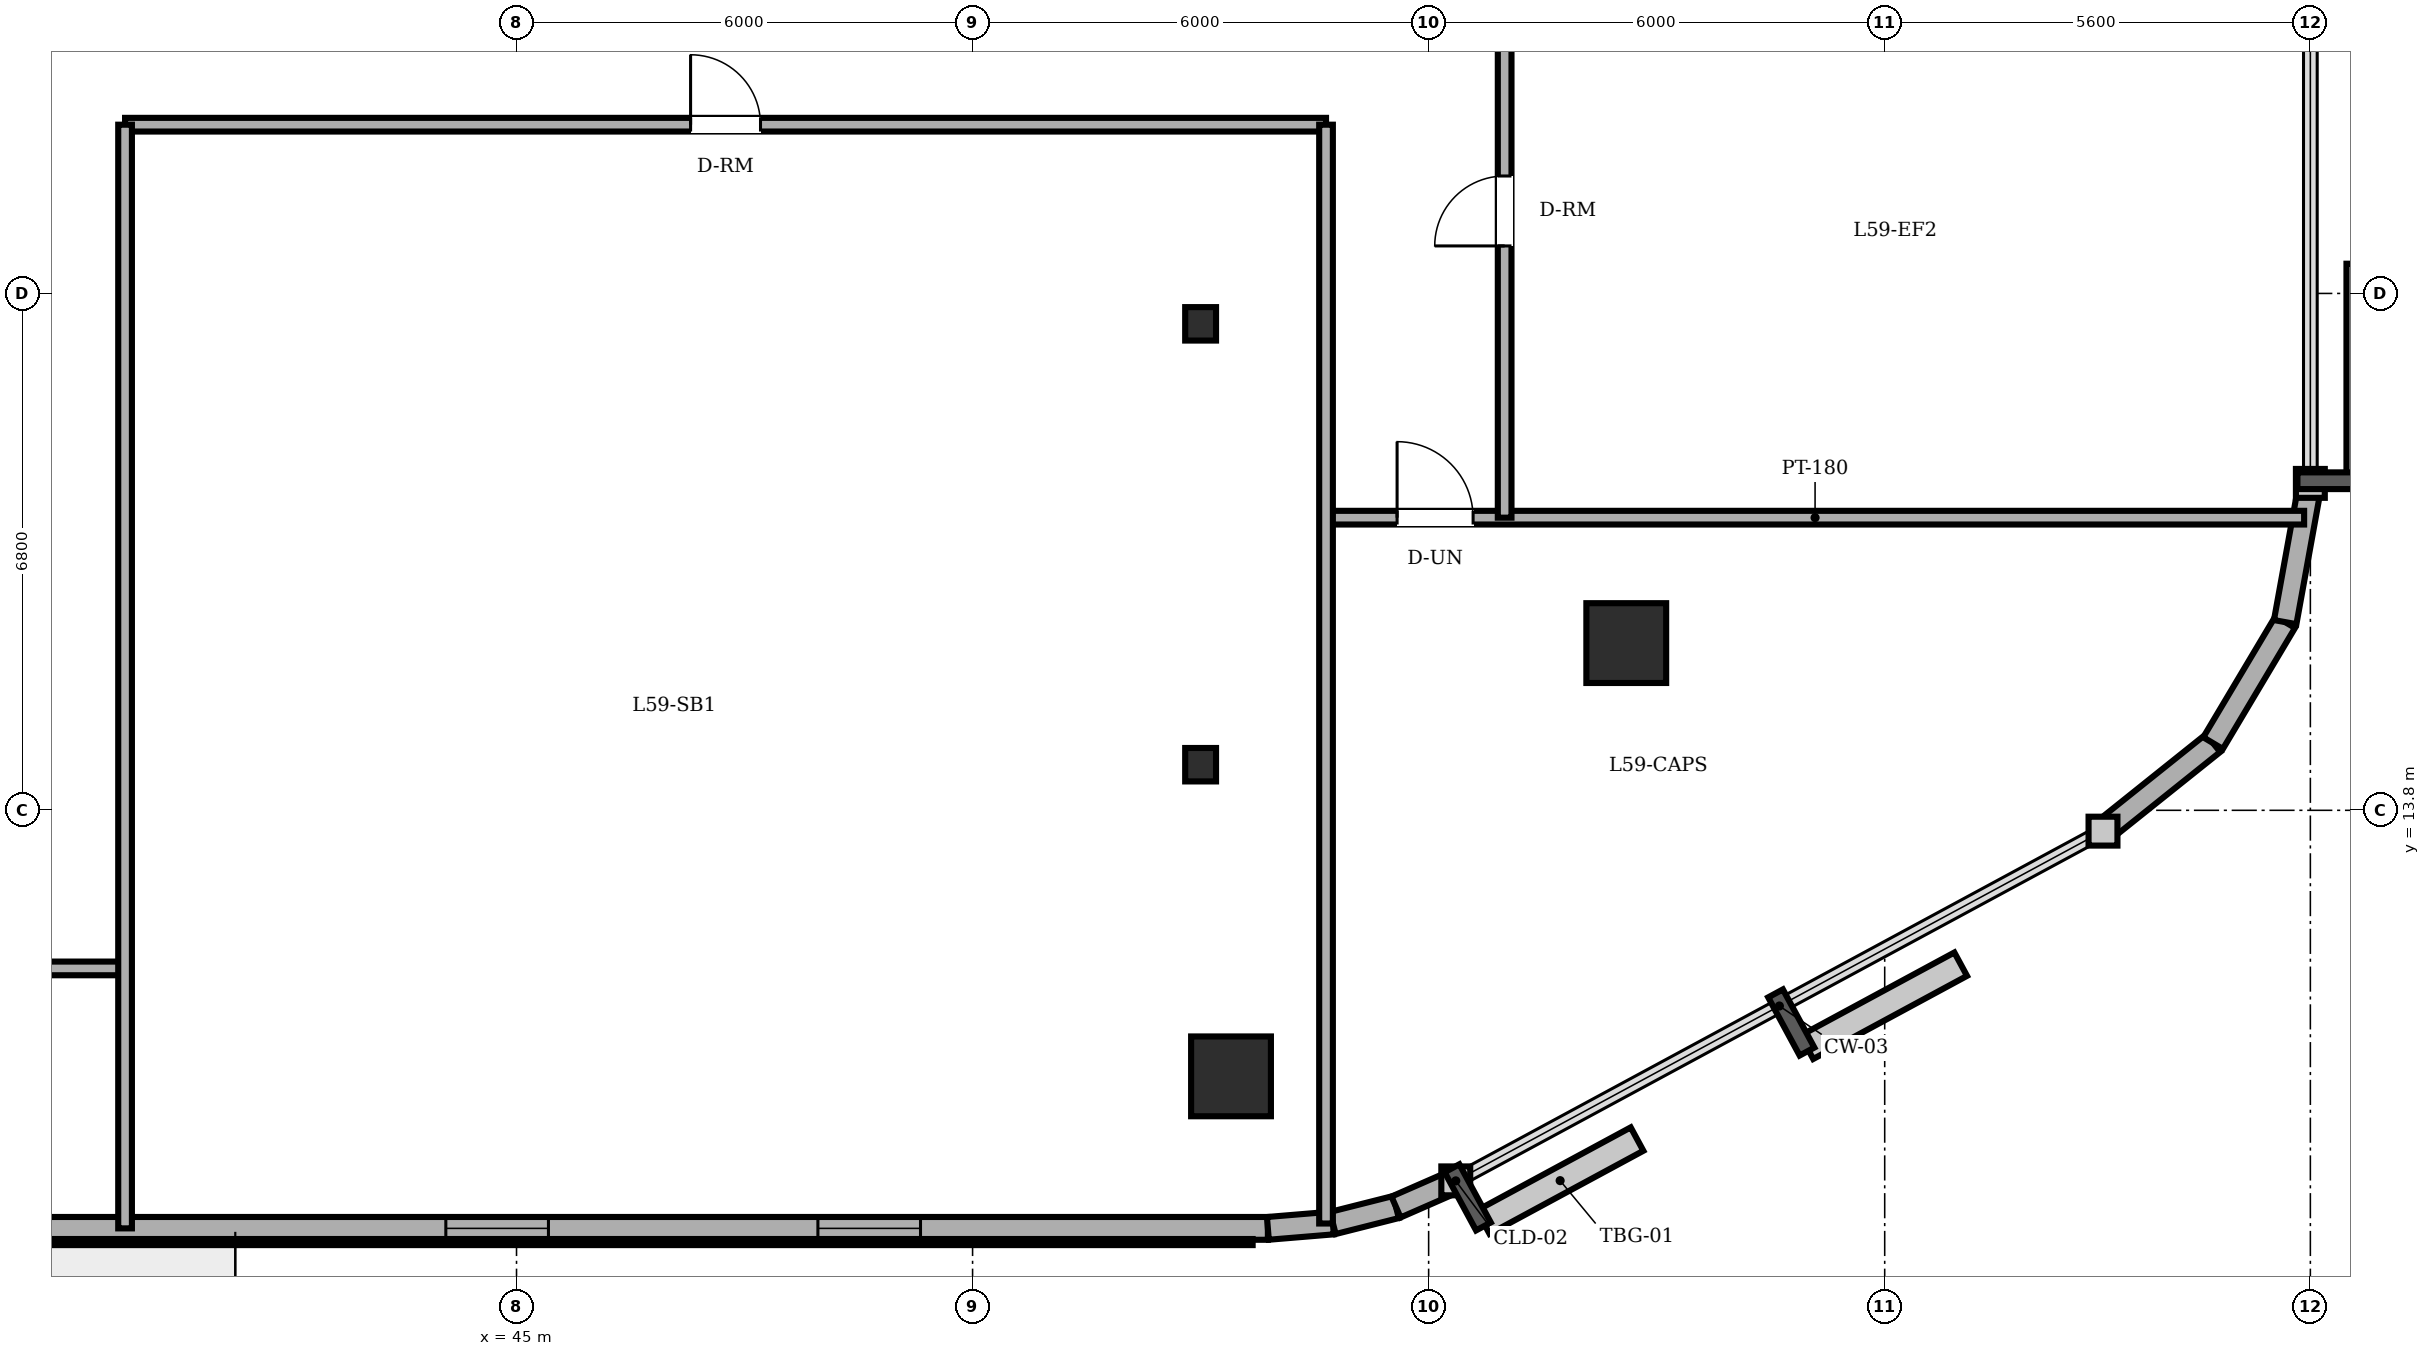
"""IFC4 building model, lengths in metres.
Left out: names, types, materials, properties, quantities, classifications, styles, units other than length and angle.
Written with IfcOpenShell. Run it as: python <this file> out.ifc"""

import sys

from ifc_helpers import new_model, si_unit, direction, frame, frame_2d, origin, origin_2d, place, context, subcontext, project, spatial, rectangle, circle, i_section, extrude, element, fill, save


model = new_model("IFC4")
c1 = context("Model", 3, precision=1e-05, world=origin(), true_north=direction((0.0, 1.0)))
c2 = subcontext(c1, "Body", "Model", "MODEL_VIEW")
j1 = project(units=[si_unit("LENGTHUNIT", "METRE"), si_unit("PLANEANGLEUNIT", "RADIAN")], contexts=[c1])
p1 = place(None, origin())
s1 = spatial("IfcSite", under=j1, at=p1, CompositionType="ELEMENT")
p2 = place(p1, origin())
s2 = spatial("IfcBuilding", under=s1, at=p2, CompositionType="ELEMENT")
p3 = place(p2, frame((0.0, 0.0, 226.5)))
s3 = spatial("IfcBuildingStorey", under=s2, at=p3, CompositionType="ELEMENT", Elevation=226.5)
for number, where, z_axis, x_axis in (
    (1, (54.4, 10.3, 0.0), (0.0, 0.0, 1.0), (1.0, 0.0, 0.0)),
    (2, (59.6, 16.0, 0.0), (0.0, 0.0, 1.0), (1.0, 0.0, 0.0)),
):
    element("IfcColumn", number, at=place(p3, frame(where, z_axis=z_axis, x_axis=x_axis)), inside=s3, PredefinedType="COLUMN", context=c2, shape_type="SweptSolid", body=[
        extrude(circle(Radius=0.525, at=origin_2d()), origin(), (0.0, 0.0, 1.0), 3.6),
    ])
for number, where, z_axis, x_axis in (
    (3, (54.0, 14.4, 0.0), (0.0, 0.0, 1.0), (1.0, 0.0, 0.0)),
    (4, (54.0, 20.2, 0.0), (0.0, 0.0, 1.0), (1.0, 0.0, 0.0)),
):
    element("IfcColumn", number, at=place(p3, frame(where, z_axis=z_axis, x_axis=x_axis)), inside=s3, PredefinedType="COLUMN", context=c2, shape_type="SweptSolid", body=[
        extrude(i_section(OverallWidth=0.406, OverallDepth=0.44, WebThickness=0.024, FlangeThickness=0.039, FilletRadius=0.015, at=origin_2d()), origin(), (0.0, 0.0, 1.0), 3.6),
    ])
p4 = place(p3, frame((22.4, 8.3, 0.0), z_axis=(0.0, 0.0, 1.0), x_axis=(1.0, 0.0, 0.0)))
e5 = element("IfcWall", 5, at=p4, inside=s3, PredefinedType="SOLIDWALL", context=c2, shape_type="SweptSolid", body=[
    extrude(rectangle(XDim=32.485, YDim=0.3, at=frame_2d((16.243, 0.0))), origin(), (0.0, 0.0, 1.0), 3.4),
])
p5 = place(p4, frame((12.425, 0.0, 0.0)))
e6 = element("IfcOpeningElement", 6, at=p5, cuts=e5, PredefinedType="OPENING", context=c2, shape_type="SweptSolid", body=[
    extrude(rectangle(XDim=0.95, YDim=2.2, at=frame_2d((0.475, 1.1))), frame((0.0, 0.16, 0.0), z_axis=(0.0, -1.0, 0.0), x_axis=(1.0, 0.0, 0.0)), (0.0, 0.0, 1.0), 0.32),
])
p6 = place(p4, frame((1.3, 0.0, 0.85)))
e7 = element("IfcOpeningElement", 7, at=p6, cuts=e5, PredefinedType="OPENING", context=c2, shape_type="SweptSolid", body=[
    extrude(rectangle(XDim=1.35, YDim=1.55, at=frame_2d((0.675, 0.775))), frame((0.0, 0.16, 0.0), z_axis=(0.0, -1.0, 0.0), x_axis=(1.0, 0.0, 0.0)), (0.0, 0.0, 1.0), 0.32),
])
p7 = place(p4, frame((4.825, 0.0, 0.85)))
e8 = element("IfcOpeningElement", 8, at=p7, cuts=e5, PredefinedType="OPENING", context=c2, shape_type="SweptSolid", body=[
    extrude(rectangle(XDim=1.35, YDim=1.55, at=frame_2d((0.675, 0.775))), frame((0.0, 0.16, 0.0), z_axis=(0.0, -1.0, 0.0), x_axis=(1.0, 0.0, 0.0)), (0.0, 0.0, 1.0), 0.32),
])
p8 = place(p4, frame((10.075, 0.0, 0.85)))
e9 = element("IfcOpeningElement", 9, at=p8, cuts=e5, PredefinedType="OPENING", context=c2, shape_type="SweptSolid", body=[
    extrude(rectangle(XDim=1.35, YDim=1.55, at=frame_2d((0.675, 0.775))), frame((0.0, 0.16, 0.0), z_axis=(0.0, -1.0, 0.0), x_axis=(1.0, 0.0, 0.0)), (0.0, 0.0, 1.0), 0.32),
])
p9 = place(p4, frame((21.67, 0.0, 0.85)))
e10 = element("IfcOpeningElement", 10, at=p9, cuts=e5, PredefinedType="OPENING", context=c2, shape_type="SweptSolid", body=[
    extrude(rectangle(XDim=1.35, YDim=1.55, at=frame_2d((0.675, 0.775))), frame((0.0, 0.16, 0.0), z_axis=(0.0, -1.0, 0.0), x_axis=(1.0, 0.0, 0.0)), (0.0, 0.0, 1.0), 0.32),
])
p10 = place(p4, frame((26.565, 0.0, 0.85)))
e11 = element("IfcOpeningElement", 11, at=p10, cuts=e5, PredefinedType="OPENING", context=c2, shape_type="SweptSolid", body=[
    extrude(rectangle(XDim=1.35, YDim=1.55, at=frame_2d((0.675, 0.775))), frame((0.0, 0.16, 0.0), z_axis=(0.0, -1.0, 0.0), x_axis=(1.0, 0.0, 0.0)), (0.0, 0.0, 1.0), 0.32),
])
p11 = place(p3, frame((54.885, 8.3, 0.0), z_axis=(0.0, 0.0, 1.0), x_axis=(0.996565355958, 0.082809971041, 0.0)))
e12 = element("IfcWall", 12, at=p11, inside=s3, PredefinedType="SOLIDWALL", context=c2, shape_type="SweptSolid", body=[
    extrude(rectangle(XDim=0.858, YDim=0.3, at=frame_2d((0.429, 0.0))), origin(), (0.0, 0.0, 1.0), 3.4),
])
p12 = place(p3, frame((55.74, 8.371, 0.0), z_axis=(0.0, 0.0, 1.0), x_axis=(0.969536346338, 0.244947490555, 0.0)))
e13 = element("IfcWall", 13, at=p12, inside=s3, PredefinedType="SOLIDWALL", context=c2, shape_type="SweptSolid", body=[
    extrude(rectangle(XDim=0.857, YDim=0.3, at=frame_2d((0.429, 0.0))), origin(), (0.0, 0.0, 1.0), 3.4),
])
p13 = place(p3, frame((56.571, 8.581, 0.0), z_axis=(0.0, 0.0, 1.0), x_axis=(0.916085473636, 0.400983048261, 0.0)))
e14 = element("IfcWall", 14, at=p13, inside=s3, PredefinedType="SOLIDWALL", context=c2, shape_type="SweptSolid", body=[
    extrude(rectangle(XDim=0.858, YDim=0.3, at=frame_2d((0.429, 0.0))), origin(), (0.0, 0.0, 1.0), 3.4),
])
p14 = place(p3, frame((65.872, 13.526, 0.0), z_axis=(0.0, 0.0, 1.0), x_axis=(0.780920189257, 0.624630817372, 0.0)))
e15 = element("IfcWall", 15, at=p14, inside=s3, PredefinedType="SOLIDWALL", context=c2, shape_type="SweptSolid", body=[
    extrude(rectangle(XDim=1.854, YDim=0.3, at=frame_2d((0.927, 0.0))), origin(), (0.0, 0.0, 1.0), 3.4),
])
p15 = place(p3, frame((67.32, 14.684, 0.0), z_axis=(0.0, 0.0, 1.0), x_axis=(0.512072018927, 0.858942516955, 0.0)))
e16 = element("IfcWall", 16, at=p15, inside=s3, PredefinedType="SOLIDWALL", context=c2, shape_type="SweptSolid", body=[
    extrude(rectangle(XDim=1.853, YDim=0.3, at=frame_2d((0.927, 0.0))), origin(), (0.0, 0.0, 1.0), 3.4),
])
p16 = place(p3, frame((68.269, 16.276, 0.0), z_axis=(0.0, 0.0, 1.0), x_axis=(0.178468469252, 0.983945631365, 0.0)))
e17 = element("IfcWall", 17, at=p16, inside=s3, PredefinedType="SOLIDWALL", context=c2, shape_type="SweptSolid", body=[
    extrude(rectangle(XDim=1.855, YDim=0.3, at=frame_2d((0.927, 0.0))), origin(), (0.0, 0.0, 1.0), 3.4),
])
p17 = place(p3, frame((17.677, 11.72, 0.0), z_axis=(0.0, 0.0, 1.0), x_axis=(1.0, 0.0, 0.0)))
e18 = element("IfcWall", 18, at=p17, inside=s3, PredefinedType="PARTITIONING", context=c2, shape_type="SweptSolid", body=[
    extrude(rectangle(XDim=22.173, YDim=0.18, at=frame_2d((11.086, 0.0))), origin(), (0.0, 0.0, 1.0), 3.4),
])
p18 = place(p17, frame((9.763, 0.0, 0.0)))
e19 = element("IfcOpeningElement", 19, at=p18, cuts=e18, PredefinedType="OPENING", context=c2, shape_type="SweptSolid", body=[
    extrude(rectangle(XDim=0.92, YDim=2.1, at=frame_2d((0.46, 1.05))), frame((0.0, 0.1, 0.0), z_axis=(0.0, -1.0, 0.0), x_axis=(1.0, 0.0, 0.0)), (0.0, 0.0, 1.0), 0.2),
])
p19 = place(p17, frame((4.063, 0.0, 0.0)))
e20 = element("IfcOpeningElement", 20, at=p19, cuts=e18, PredefinedType="OPENING", context=c2, shape_type="SweptSolid", body=[
    extrude(rectangle(XDim=0.92, YDim=2.1, at=frame_2d((0.46, 1.05))), frame((0.0, 0.1, 0.0), z_axis=(0.0, -1.0, 0.0), x_axis=(1.0, 0.0, 0.0)), (0.0, 0.0, 1.0), 0.2),
])
p20 = place(p17, frame((16.428, 0.0, 0.0)))
e21 = element("IfcOpeningElement", 21, at=p20, cuts=e18, PredefinedType="OPENING", context=c2, shape_type="SweptSolid", body=[
    extrude(rectangle(XDim=0.92, YDim=2.1, at=frame_2d((0.46, 1.05))), frame((0.0, 0.1, 0.0), z_axis=(0.0, -1.0, 0.0), x_axis=(1.0, 0.0, 0.0)), (0.0, 0.0, 1.0), 0.2),
])
p21 = place(p3, frame((55.65, 17.65, 0.0), z_axis=(0.0, 0.0, 1.0), x_axis=(1.0, 0.0, 0.0)))
e22 = element("IfcWall", 22, at=p21, inside=s3, PredefinedType="PARTITIONING", context=c2, shape_type="SweptSolid", body=[
    extrude(rectangle(XDim=12.868, YDim=0.18, at=frame_2d((6.434, 0.0))), origin(), (0.0, 0.0, 1.0), 3.4),
])
p22 = place(p21, frame((0.935, 0.0, 0.0)))
e23 = element("IfcOpeningElement", 23, at=p22, cuts=e22, PredefinedType="OPENING", context=c2, shape_type="SweptSolid", body=[
    extrude(rectangle(XDim=1.0, YDim=2.15, at=frame_2d((0.5, 1.075))), frame((0.0, 0.1, 0.0), z_axis=(0.0, -1.0, 0.0), x_axis=(1.0, 0.0, 0.0)), (0.0, 0.0, 1.0), 0.2),
])
p23 = place(p3, frame((39.85, 22.82, 0.0), z_axis=(0.0, 0.0, 1.0), x_axis=(1.0, 0.0, 0.0)))
e24 = element("IfcWall", 24, at=p23, inside=s3, PredefinedType="PARTITIONING", context=c2, shape_type="SweptSolid", body=[
    extrude(rectangle(XDim=15.8, YDim=0.18, at=frame_2d((7.9, 0.0))), origin(), (0.0, 0.0, 1.0), 3.4),
])
p24 = place(p23, frame((7.44, 0.0, 0.0)))
e25 = element("IfcOpeningElement", 25, at=p24, cuts=e24, PredefinedType="OPENING", context=c2, shape_type="SweptSolid", body=[
    extrude(rectangle(XDim=0.92, YDim=2.1, at=frame_2d((0.46, 1.05))), frame((0.0, 0.1, 0.0), z_axis=(0.0, -1.0, 0.0), x_axis=(1.0, 0.0, 0.0)), (0.0, 0.0, 1.0), 0.2),
])
p25 = place(p3, frame((39.85, 8.3, 0.0), z_axis=(0.0, 0.0, 1.0), x_axis=(0.0, 1.0, 0.0)))
e26 = element("IfcWall", 26, at=p25, inside=s3, PredefinedType="PARTITIONING", context=c2, shape_type="SweptSolid", body=[
    extrude(rectangle(XDim=14.52, YDim=0.18, at=frame_2d((7.26, 0.0))), origin(), (0.0, 0.0, 1.0), 3.4),
])
p26 = place(p3, frame((55.65, 8.364, 0.0), z_axis=(0.0, 0.0, 1.0), x_axis=(0.0, 1.0, 0.0)))
e27 = element("IfcWall", 27, at=p26, inside=s3, PredefinedType="PARTITIONING", context=c2, shape_type="SweptSolid", body=[
    extrude(rectangle(XDim=14.456, YDim=0.18, at=frame_2d((7.228, 0.0))), origin(), (0.0, 0.0, 1.0), 3.4),
])
p27 = place(p3, frame((58.0, 17.65, 0.0), z_axis=(0.0, 0.0, 1.0), x_axis=(0.0, 1.0, 0.0)))
e28 = element("IfcWall", 28, at=p27, inside=s3, PredefinedType="PARTITIONING", context=c2, shape_type="SweptSolid", body=[
    extrude(rectangle(XDim=12.7, YDim=0.18, at=frame_2d((6.35, 0.0))), origin(), (0.0, 0.0, 1.0), 3.4),
])
p28 = place(p27, frame((9.365, 0.0, 0.0)))
e29 = element("IfcOpeningElement", 29, at=p28, cuts=e28, PredefinedType="OPENING", context=c2, shape_type="SweptSolid", body=[
    extrude(rectangle(XDim=1.0, YDim=2.15, at=frame_2d((0.5, 1.075))), frame((0.0, 0.1, 0.0), z_axis=(0.0, -1.0, 0.0), x_axis=(1.0, 0.0, 0.0)), (0.0, 0.0, 1.0), 0.2),
])
p29 = place(p27, frame((3.575, 0.0, 0.0)))
e30 = element("IfcOpeningElement", 30, at=p29, cuts=e28, PredefinedType="OPENING", context=c2, shape_type="SweptSolid", body=[
    extrude(rectangle(XDim=0.92, YDim=2.1, at=frame_2d((0.46, 1.05))), frame((0.0, 0.1, 0.0), z_axis=(0.0, -1.0, 0.0), x_axis=(1.0, 0.0, 0.0)), (0.0, 0.0, 1.0), 0.2),
])
p30 = place(p9, origin())
e31 = element("IfcWindow", 31, at=p30, inside=s3, PartitioningType="SINGLE_PANEL", PredefinedType="WINDOW", context=c2, shape_type="SweptSolid", body=[
    extrude(rectangle(XDim=1.35, YDim=1.55, at=frame_2d((0.675, 0.775))), frame((0.0, 0.03, 0.0), z_axis=(0.0, -1.0, 0.0), x_axis=(1.0, 0.0, 0.0)), (0.0, 0.0, 1.0), 0.06),
])
fill(e10, e31)
p31 = place(p10, origin())
e32 = element("IfcWindow", 32, at=p31, inside=s3, PartitioningType="SINGLE_PANEL", PredefinedType="WINDOW", context=c2, shape_type="SweptSolid", body=[
    extrude(rectangle(XDim=1.35, YDim=1.55, at=frame_2d((0.675, 0.775))), frame((0.0, 0.03, 0.0), z_axis=(0.0, -1.0, 0.0), x_axis=(1.0, 0.0, 0.0)), (0.0, 0.0, 1.0), 0.06),
])
fill(e11, e32)
p32 = place(p24, origin())
e33 = element("IfcDoor", 33, at=p32, inside=s3, OperationType="SINGLE_SWING_LEFT", PredefinedType="DOOR", context=c2, shape_type="SweptSolid", body=[
    extrude(rectangle(XDim=0.92, YDim=2.1, at=frame_2d((0.46, 1.05))), frame((0.0, 0.025, 0.0), z_axis=(0.0, -1.0, 0.0), x_axis=(1.0, 0.0, 0.0)), (0.0, 0.0, 1.0), 0.05),
])
fill(e25, e33)
p33 = place(p22, origin())
e34 = element("IfcDoor", 34, at=p33, inside=s3, OperationType="SINGLE_SWING_LEFT", PredefinedType="DOOR", context=c2, shape_type="SweptSolid", body=[
    extrude(rectangle(XDim=1.0, YDim=2.15, at=frame_2d((0.5, 1.075))), frame((0.0, 0.025, 0.0), z_axis=(0.0, -1.0, 0.0), x_axis=(1.0, 0.0, 0.0)), (0.0, 0.0, 1.0), 0.05),
])
fill(e23, e34)
p34 = place(p29, origin())
e35 = element("IfcDoor", 35, at=p34, inside=s3, OperationType="SINGLE_SWING_LEFT", PredefinedType="DOOR", context=c2, shape_type="SweptSolid", body=[
    extrude(rectangle(XDim=0.92, YDim=2.1, at=frame_2d((0.46, 1.05))), frame((0.0, 0.025, 0.0), z_axis=(0.0, -1.0, 0.0), x_axis=(1.0, 0.0, 0.0)), (0.0, 0.0, 1.0), 0.05),
])
fill(e30, e35)
save(model, sys.argv[1])
